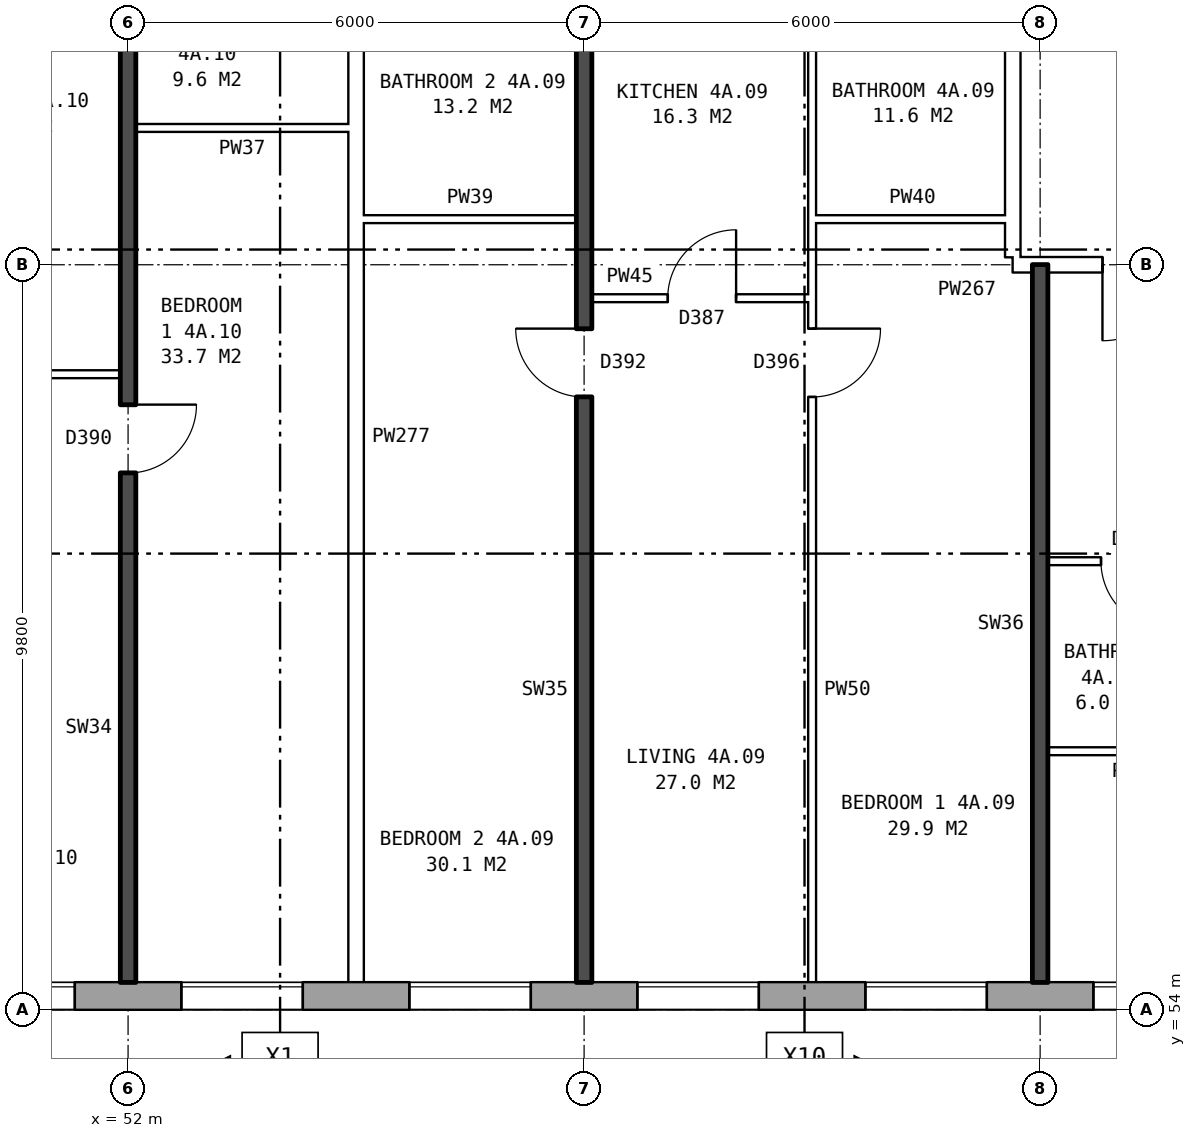
"""IFC4 building model, lengths in metres.
Left out: names, types, materials, properties, quantities, classifications, styles, units other than length and angle.
Written with IfcOpenShell. Run it as: python <this file> out.ifc"""

import sys

from ifc_helpers import new_model, si_unit, direction, frame, frame_2d, origin, place, context, subcontext, project, spatial, rectangle, extrude, element, fill, save


model = new_model("IFC4")
c1 = context("Model", 3, precision=1e-05, world=origin(), true_north=direction((0.0, 1.0)))
c2 = subcontext(c1, "Body", "Model", "MODEL_VIEW")
j1 = project(units=[si_unit("LENGTHUNIT", "METRE"), si_unit("PLANEANGLEUNIT", "RADIAN")], contexts=[c1])
p1 = place(None, origin())
s1 = spatial("IfcSite", under=j1, at=p1, CompositionType="ELEMENT")
p2 = place(p1, origin())
s2 = spatial("IfcBuilding", under=s1, at=p2, CompositionType="ELEMENT")
p3 = place(p2, frame((0.0, 0.0, 19.5)))
s3 = spatial("IfcBuildingStorey", under=s2, at=p3, CompositionType="ELEMENT", Elevation=19.5)
p4 = place(p3, frame((22.825, 54.18, 0.0), z_axis=(0.0, 0.0, 1.0), x_axis=(1.0, 0.0, 0.0)))
e1 = element("IfcWall", 1, at=p4, inside=s3, PredefinedType="STANDARD", context=c2, shape_type="SweptSolid", body=[
    extrude(rectangle(XDim=50.101, YDim=0.36, at=frame_2d((25.05, 0.0))), origin(), (0.0, 0.0, 1.0), 2.85),
])
p5 = place(p4, frame((2.875, 0.0, 0.8)))
e2 = element("IfcOpeningElement", 2, at=p5, cuts=e1, PredefinedType="OPENING", context=c2, shape_type="SweptSolid", body=[
    extrude(rectangle(XDim=1.6, YDim=1.8, at=frame_2d((0.8, 0.9))), frame((0.0, 0.19, 0.0), z_axis=(0.0, -1.0, 0.0), x_axis=(1.0, 0.0, 0.0)), (0.0, 0.0, 1.0), 0.38),
])
p6 = place(p4, frame((5.875, 0.0, 0.8)))
e3 = element("IfcOpeningElement", 3, at=p6, cuts=e1, PredefinedType="OPENING", context=c2, shape_type="SweptSolid", body=[
    extrude(rectangle(XDim=1.6, YDim=1.8, at=frame_2d((0.8, 0.9))), frame((0.0, 0.19, 0.0), z_axis=(0.0, -1.0, 0.0), x_axis=(1.0, 0.0, 0.0)), (0.0, 0.0, 1.0), 0.38),
])
p7 = place(p4, frame((8.875, 0.0, 0.8)))
e4 = element("IfcOpeningElement", 4, at=p7, cuts=e1, PredefinedType="OPENING", context=c2, shape_type="SweptSolid", body=[
    extrude(rectangle(XDim=1.6, YDim=1.8, at=frame_2d((0.8, 0.9))), frame((0.0, 0.19, 0.0), z_axis=(0.0, -1.0, 0.0), x_axis=(1.0, 0.0, 0.0)), (0.0, 0.0, 1.0), 0.38),
])
p8 = place(p4, frame((11.875, 0.0, 0.8)))
e5 = element("IfcOpeningElement", 5, at=p8, cuts=e1, PredefinedType="OPENING", context=c2, shape_type="SweptSolid", body=[
    extrude(rectangle(XDim=1.6, YDim=1.8, at=frame_2d((0.8, 0.9))), frame((0.0, 0.19, 0.0), z_axis=(0.0, -1.0, 0.0), x_axis=(1.0, 0.0, 0.0)), (0.0, 0.0, 1.0), 0.38),
])
p9 = place(p4, frame((14.875, 0.0, 0.8)))
e6 = element("IfcOpeningElement", 6, at=p9, cuts=e1, PredefinedType="OPENING", context=c2, shape_type="SweptSolid", body=[
    extrude(rectangle(XDim=1.6, YDim=1.8, at=frame_2d((0.8, 0.9))), frame((0.0, 0.19, 0.0), z_axis=(0.0, -1.0, 0.0), x_axis=(1.0, 0.0, 0.0)), (0.0, 0.0, 1.0), 0.38),
])
p10 = place(p4, frame((17.875, 0.0, 0.8)))
e7 = element("IfcOpeningElement", 7, at=p10, cuts=e1, PredefinedType="OPENING", context=c2, shape_type="SweptSolid", body=[
    extrude(rectangle(XDim=1.6, YDim=1.8, at=frame_2d((0.8, 0.9))), frame((0.0, 0.19, 0.0), z_axis=(0.0, -1.0, 0.0), x_axis=(1.0, 0.0, 0.0)), (0.0, 0.0, 1.0), 0.38),
])
p11 = place(p4, frame((20.875, 0.0, 0.8)))
e8 = element("IfcOpeningElement", 8, at=p11, cuts=e1, PredefinedType="OPENING", context=c2, shape_type="SweptSolid", body=[
    extrude(rectangle(XDim=1.6, YDim=1.8, at=frame_2d((0.8, 0.9))), frame((0.0, 0.19, 0.0), z_axis=(0.0, -1.0, 0.0), x_axis=(1.0, 0.0, 0.0)), (0.0, 0.0, 1.0), 0.38),
])
p12 = place(p4, frame((23.875, 0.0, 0.8)))
e9 = element("IfcOpeningElement", 9, at=p12, cuts=e1, PredefinedType="OPENING", context=c2, shape_type="SweptSolid", body=[
    extrude(rectangle(XDim=1.6, YDim=1.8, at=frame_2d((0.8, 0.9))), frame((0.0, 0.19, 0.0), z_axis=(0.0, -1.0, 0.0), x_axis=(1.0, 0.0, 0.0)), (0.0, 0.0, 1.0), 0.38),
])
p13 = place(p4, frame((26.875, 0.0, 0.8)))
e10 = element("IfcOpeningElement", 10, at=p13, cuts=e1, PredefinedType="OPENING", context=c2, shape_type="SweptSolid", body=[
    extrude(rectangle(XDim=1.6, YDim=1.8, at=frame_2d((0.8, 0.9))), frame((0.0, 0.19, 0.0), z_axis=(0.0, -1.0, 0.0), x_axis=(1.0, 0.0, 0.0)), (0.0, 0.0, 1.0), 0.38),
])
p14 = place(p4, frame((29.875, 0.0, 0.8)))
e11 = element("IfcOpeningElement", 11, at=p14, cuts=e1, PredefinedType="OPENING", context=c2, shape_type="SweptSolid", body=[
    extrude(rectangle(XDim=1.6, YDim=1.8, at=frame_2d((0.8, 0.9))), frame((0.0, 0.19, 0.0), z_axis=(0.0, -1.0, 0.0), x_axis=(1.0, 0.0, 0.0)), (0.0, 0.0, 1.0), 0.38),
])
p15 = place(p4, frame((32.875, 0.0, 0.8)))
e12 = element("IfcOpeningElement", 12, at=p15, cuts=e1, PredefinedType="OPENING", context=c2, shape_type="SweptSolid", body=[
    extrude(rectangle(XDim=1.6, YDim=1.8, at=frame_2d((0.8, 0.9))), frame((0.0, 0.19, 0.0), z_axis=(0.0, -1.0, 0.0), x_axis=(1.0, 0.0, 0.0)), (0.0, 0.0, 1.0), 0.38),
])
p16 = place(p4, frame((35.875, 0.0, 0.8)))
e13 = element("IfcOpeningElement", 13, at=p16, cuts=e1, PredefinedType="OPENING", context=c2, shape_type="SweptSolid", body=[
    extrude(rectangle(XDim=1.6, YDim=1.8, at=frame_2d((0.8, 0.9))), frame((0.0, 0.19, 0.0), z_axis=(0.0, -1.0, 0.0), x_axis=(1.0, 0.0, 0.0)), (0.0, 0.0, 1.0), 0.38),
])
p17 = place(p4, frame((38.875, 0.0, 0.8)))
e14 = element("IfcOpeningElement", 14, at=p17, cuts=e1, PredefinedType="OPENING", context=c2, shape_type="SweptSolid", body=[
    extrude(rectangle(XDim=1.6, YDim=1.8, at=frame_2d((0.8, 0.9))), frame((0.0, 0.19, 0.0), z_axis=(0.0, -1.0, 0.0), x_axis=(1.0, 0.0, 0.0)), (0.0, 0.0, 1.0), 0.38),
])
p18 = place(p4, frame((41.875, 0.0, 0.8)))
e15 = element("IfcOpeningElement", 15, at=p18, cuts=e1, PredefinedType="OPENING", context=c2, shape_type="SweptSolid", body=[
    extrude(rectangle(XDim=1.6, YDim=1.8, at=frame_2d((0.8, 0.9))), frame((0.0, 0.19, 0.0), z_axis=(0.0, -1.0, 0.0), x_axis=(1.0, 0.0, 0.0)), (0.0, 0.0, 1.0), 0.38),
])
p19 = place(p4, frame((44.875, 0.0, 0.8)))
e16 = element("IfcOpeningElement", 16, at=p19, cuts=e1, PredefinedType="OPENING", context=c2, shape_type="SweptSolid", body=[
    extrude(rectangle(XDim=1.6, YDim=1.8, at=frame_2d((0.8, 0.9))), frame((0.0, 0.19, 0.0), z_axis=(0.0, -1.0, 0.0), x_axis=(1.0, 0.0, 0.0)), (0.0, 0.0, 1.0), 0.38),
])
p20 = place(p4, frame((47.375, 0.0, 0.8)))
e17 = element("IfcOpeningElement", 17, at=p20, cuts=e1, PredefinedType="OPENING", context=c2, shape_type="SweptSolid", body=[
    extrude(rectangle(XDim=1.0, YDim=1.5, at=frame_2d((0.5, 0.75))), frame((0.0, 0.19, 0.0), z_axis=(0.0, -1.0, 0.0), x_axis=(1.0, 0.0, 0.0)), (0.0, 0.0, 1.0), 0.38),
])
p21 = place(p4, frame((48.675, 0.0, 0.8)))
e18 = element("IfcOpeningElement", 18, at=p21, cuts=e1, PredefinedType="OPENING", context=c2, shape_type="SweptSolid", body=[
    extrude(rectangle(XDim=0.6, YDim=0.9, at=frame_2d((0.3, 0.45))), frame((0.0, 0.19, 0.0), z_axis=(0.0, -1.0, 0.0), x_axis=(1.0, 0.0, 0.0)), (0.0, 0.0, 1.0), 0.38),
])
p22 = place(p3, frame((63.64, 63.9, 0.0), z_axis=(0.0, 0.0, 1.0), x_axis=(0.0, 1.0, 0.0)))
e19 = element("IfcWall", 19, at=p22, inside=s3, PredefinedType="PARTITIONING", context=c2, shape_type="SweptSolid", body=[
    extrude(rectangle(XDim=12.2, YDim=0.2, at=frame_2d((6.1, 0.0))), origin(), (0.0, 0.0, 1.0), 2.85),
])
p23 = place(p22, frame((5.1, 0.0, 0.0)))
e20 = element("IfcOpeningElement", 20, at=p23, cuts=e19, PredefinedType="OPENING", context=c2, shape_type="SweptSolid", body=[
    extrude(rectangle(XDim=2.0, YDim=2.1, at=frame_2d((1.0, 1.05))), frame((0.0, 0.11, 0.0), z_axis=(0.0, -1.0, 0.0), x_axis=(1.0, 0.0, 0.0)), (0.0, 0.0, 1.0), 0.22),
])
p24 = place(p3, frame((64.1, 57.4, 0.0), z_axis=(0.0, 0.0, 1.0), x_axis=(1.0, 0.0, 0.0)))
e21 = element("IfcWall", 21, at=p24, inside=s3, PredefinedType="PARTITIONING", context=c2, shape_type="SweptSolid", body=[
    extrude(rectangle(XDim=2.3, YDim=0.1, at=frame_2d((1.15, 0.0))), origin(), (0.0, 0.0, 1.0), 2.85),
])
p25 = place(p3, frame((64.1, 59.9, 0.0), z_axis=(0.0, 0.0, 1.0), x_axis=(1.0, 0.0, 0.0)))
e22 = element("IfcWall", 22, at=p25, inside=s3, PredefinedType="PARTITIONING", context=c2, shape_type="SweptSolid", body=[
    extrude(rectangle(XDim=5.8, YDim=0.1, at=frame_2d((2.9, 0.0))), origin(), (0.0, 0.0, 1.0), 2.85),
])
p26 = place(p25, frame((3.6, 0.0, 0.0)))
e23 = element("IfcOpeningElement", 23, at=p26, cuts=e22, PredefinedType="OPENING", context=c2, shape_type="SweptSolid", body=[
    extrude(rectangle(XDim=0.9, YDim=2.1, at=frame_2d((0.45, 1.05))), frame((0.0, 0.06, 0.0), z_axis=(0.0, -1.0, 0.0), x_axis=(1.0, 0.0, 0.0)), (0.0, 0.0, 1.0), 0.12),
])
p27 = place(p25, frame((0.7, 0.0, 0.0)))
e24 = element("IfcOpeningElement", 24, at=p27, cuts=e22, PredefinedType="OPENING", context=c2, shape_type="SweptSolid", body=[
    extrude(rectangle(XDim=0.9, YDim=2.1, at=frame_2d((0.45, 1.05))), frame((0.0, 0.06, 0.0), z_axis=(0.0, -1.0, 0.0), x_axis=(1.0, 0.0, 0.0)), (0.0, 0.0, 1.0), 0.12),
])
p28 = place(p3, frame((49.0, 62.36, 0.0), z_axis=(0.0, 0.0, 1.0), x_axis=(1.0, 0.0, 0.0)))
e25 = element("IfcWall", 25, at=p28, inside=s3, PredefinedType="PARTITIONING", context=c2, shape_type="SweptSolid", body=[
    extrude(rectangle(XDim=2.9, YDim=0.1, at=frame_2d((1.45, 0.0))), origin(), (0.0, 0.0, 1.0), 2.85),
])
p29 = place(p28, frame((1.0, 0.0, 0.0)))
e26 = element("IfcOpeningElement", 26, at=p29, cuts=e25, PredefinedType="OPENING", context=c2, shape_type="SweptSolid", body=[
    extrude(rectangle(XDim=0.9, YDim=2.1, at=frame_2d((0.45, 1.05))), frame((0.0, 0.06, 0.0), z_axis=(0.0, -1.0, 0.0), x_axis=(1.0, 0.0, 0.0)), (0.0, 0.0, 1.0), 0.12),
])
p30 = place(p3, frame((58.1, 63.36, 0.0), z_axis=(0.0, 0.0, 1.0), x_axis=(1.0, 0.0, 0.0)))
e27 = element("IfcWall", 27, at=p30, inside=s3, PredefinedType="PARTITIONING", context=c2, shape_type="SweptSolid", body=[
    extrude(rectangle(XDim=2.9, YDim=0.1, at=frame_2d((1.45, 0.0))), origin(), (0.0, 0.0, 1.0), 2.85),
])
p31 = place(p30, frame((1.0, 0.0, 0.0)))
e28 = element("IfcOpeningElement", 28, at=p31, cuts=e27, PredefinedType="OPENING", context=c2, shape_type="SweptSolid", body=[
    extrude(rectangle(XDim=0.9, YDim=2.1, at=frame_2d((0.45, 1.05))), frame((0.0, 0.06, 0.0), z_axis=(0.0, -1.0, 0.0), x_axis=(1.0, 0.0, 0.0)), (0.0, 0.0, 1.0), 0.12),
])
p32 = place(p3, frame((63.64, 63.8, 0.0), z_axis=(0.0, 0.0, 1.0), x_axis=(1.0, 0.0, 0.0)))
e29 = element("IfcWall", 29, at=p32, inside=s3, PredefinedType="PARTITIONING", context=c2, shape_type="SweptSolid", body=[
    extrude(rectangle(XDim=3.0, YDim=0.2, at=frame_2d((1.5, 0.0))), origin(), (0.0, 0.0, 1.0), 2.85),
])
p33 = place(p32, frame((1.18, 0.0, 0.0)))
e30 = element("IfcOpeningElement", 30, at=p33, cuts=e29, PredefinedType="OPENING", context=c2, shape_type="SweptSolid", body=[
    extrude(rectangle(XDim=1.0, YDim=2.1, at=frame_2d((0.5, 1.05))), frame((0.0, 0.11, 0.0), z_axis=(0.0, -1.0, 0.0), x_axis=(1.0, 0.0, 0.0)), (0.0, 0.0, 1.0), 0.22),
])
p34 = place(p3, frame((55.1, 64.4, 0.0), z_axis=(0.0, 0.0, 1.0), x_axis=(1.0, 0.0, 0.0)))
e31 = element("IfcWall", 31, at=p34, inside=s3, PredefinedType="PARTITIONING", context=c2, shape_type="SweptSolid", body=[
    extrude(rectangle(XDim=2.8, YDim=0.1, at=frame_2d((1.4, 0.0))), origin(), (0.0, 0.0, 1.0), 2.85),
])
p35 = place(p3, frame((61.0, 64.4, 0.0), z_axis=(0.0, 0.0, 1.0), x_axis=(1.0, 0.0, 0.0)))
e32 = element("IfcWall", 32, at=p35, inside=s3, PredefinedType="PARTITIONING", context=c2, shape_type="SweptSolid", body=[
    extrude(rectangle(XDim=2.64, YDim=0.1, at=frame_2d((1.32, 0.0))), origin(), (0.0, 0.0, 1.0), 2.85),
])
p36 = place(p3, frame((52.1, 65.6, 0.0), z_axis=(0.0, 0.0, 1.0), x_axis=(1.0, 0.0, 0.0)))
e33 = element("IfcWall", 33, at=p36, inside=s3, PredefinedType="PARTITIONING", context=c2, shape_type="SweptSolid", body=[
    extrude(rectangle(XDim=2.8, YDim=0.1, at=frame_2d((1.4, 0.0))), origin(), (0.0, 0.0, 1.0), 2.85),
])
p37 = place(p3, frame((52.0, 54.36, 0.0), z_axis=(0.0, 0.0, 1.0), x_axis=(0.0, 1.0, 0.0)))
e34 = element("IfcWall", 34, at=p37, inside=s3, PredefinedType="SOLIDWALL", context=c2, shape_type="SweptSolid", body=[
    extrude(rectangle(XDim=14.44, YDim=0.2, at=frame_2d((7.22, 0.0))), origin(), (0.0, 0.0, 1.0), 2.85),
])
p38 = place(p37, frame((6.7, 0.0, 0.0)))
e35 = element("IfcOpeningElement", 35, at=p38, cuts=e34, PredefinedType="OPENING", context=c2, shape_type="SweptSolid", body=[
    extrude(rectangle(XDim=0.9, YDim=2.1, at=frame_2d((0.45, 1.05))), frame((0.0, 0.11, 0.0), z_axis=(0.0, -1.0, 0.0), x_axis=(1.0, 0.0, 0.0)), (0.0, 0.0, 1.0), 0.22),
])
p39 = place(p37, frame((13.14, 0.0, 0.0)))
e36 = element("IfcOpeningElement", 36, at=p39, cuts=e34, PredefinedType="OPENING", context=c2, shape_type="SweptSolid", body=[
    extrude(rectangle(XDim=0.9, YDim=2.1, at=frame_2d((0.45, 1.05))), frame((0.0, 0.11, 0.0), z_axis=(0.0, -1.0, 0.0), x_axis=(1.0, 0.0, 0.0)), (0.0, 0.0, 1.0), 0.22),
])
p40 = place(p3, frame((55.0, 54.36, 0.0), z_axis=(0.0, 0.0, 1.0), x_axis=(0.0, 1.0, 0.0)))
e37 = element("IfcWall", 37, at=p40, inside=s3, PredefinedType="PARTITIONING", context=c2, shape_type="SweptSolid", body=[
    extrude(rectangle(XDim=14.34, YDim=0.2, at=frame_2d((7.17, 0.0))), origin(), (0.0, 0.0, 1.0), 2.85),
])
p41 = place(p3, frame((58.0, 54.36, 0.0), z_axis=(0.0, 0.0, 1.0), x_axis=(0.0, 1.0, 0.0)))
e38 = element("IfcWall", 38, at=p41, inside=s3, PredefinedType="SOLIDWALL", context=c2, shape_type="SweptSolid", body=[
    extrude(rectangle(XDim=14.44, YDim=0.2, at=frame_2d((7.22, 0.0))), origin(), (0.0, 0.0, 1.0), 2.85),
])
p42 = place(p41, frame((7.7, 0.0, 0.0)))
e39 = element("IfcOpeningElement", 39, at=p42, cuts=e38, PredefinedType="OPENING", context=c2, shape_type="SweptSolid", body=[
    extrude(rectangle(XDim=0.9, YDim=2.1, at=frame_2d((0.45, 1.05))), frame((0.0, 0.11, 0.0), z_axis=(0.0, -1.0, 0.0), x_axis=(1.0, 0.0, 0.0)), (0.0, 0.0, 1.0), 0.22),
])
p43 = place(p41, frame((13.14, 0.0, 0.0)))
e40 = element("IfcOpeningElement", 40, at=p43, cuts=e38, PredefinedType="OPENING", context=c2, shape_type="SweptSolid", body=[
    extrude(rectangle(XDim=0.9, YDim=2.1, at=frame_2d((0.45, 1.05))), frame((0.0, 0.11, 0.0), z_axis=(0.0, -1.0, 0.0), x_axis=(1.0, 0.0, 0.0)), (0.0, 0.0, 1.0), 0.22),
])
p44 = place(p3, frame((61.0, 54.36, 0.0), z_axis=(0.0, 0.0, 1.0), x_axis=(0.0, 1.0, 0.0)))
e41 = element("IfcWall", 41, at=p44, inside=s3, PredefinedType="PARTITIONING", context=c2, shape_type="SweptSolid", body=[
    extrude(rectangle(XDim=14.34, YDim=0.1, at=frame_2d((7.17, 0.0))), origin(), (0.0, 0.0, 1.0), 2.85),
])
p45 = place(p44, frame((7.7, 0.0, 0.0)))
e42 = element("IfcOpeningElement", 42, at=p45, cuts=e41, PredefinedType="OPENING", context=c2, shape_type="SweptSolid", body=[
    extrude(rectangle(XDim=0.9, YDim=2.1, at=frame_2d((0.45, 1.05))), frame((0.0, 0.06, 0.0), z_axis=(0.0, -1.0, 0.0), x_axis=(1.0, 0.0, 0.0)), (0.0, 0.0, 1.0), 0.12),
])
p46 = place(p44, frame((13.04, 0.0, 0.0)))
e43 = element("IfcOpeningElement", 43, at=p46, cuts=e41, PredefinedType="OPENING", context=c2, shape_type="SweptSolid", body=[
    extrude(rectangle(XDim=0.9, YDim=2.1, at=frame_2d((0.45, 1.05))), frame((0.0, 0.06, 0.0), z_axis=(0.0, -1.0, 0.0), x_axis=(1.0, 0.0, 0.0)), (0.0, 0.0, 1.0), 0.12),
])
p47 = place(p3, frame((64.0, 54.36, 0.0), z_axis=(0.0, 0.0, 1.0), x_axis=(0.0, 1.0, 0.0)))
e44 = element("IfcWall", 44, at=p47, inside=s3, PredefinedType="SOLIDWALL", context=c2, shape_type="SweptSolid", body=[
    extrude(rectangle(XDim=9.44, YDim=0.2, at=frame_2d((4.72, 0.0))), origin(), (0.0, 0.0, 1.0), 2.85),
])
p48 = place(p13, origin())
e45 = element("IfcWindow", 45, at=p48, inside=s3, PartitioningType="SINGLE_PANEL", PredefinedType="WINDOW", context=c2, shape_type="SweptSolid", body=[
    extrude(rectangle(XDim=1.6, YDim=1.8, at=frame_2d((0.8, 0.9))), frame((0.0, 0.15, 0.0), z_axis=(0.0, -1.0, 0.0), x_axis=(1.0, 0.0, 0.0)), (0.0, 0.0, 1.0), 0.06),
])
fill(e10, e45)
p49 = place(p14, origin())
e46 = element("IfcWindow", 46, at=p49, inside=s3, PartitioningType="SINGLE_PANEL", PredefinedType="WINDOW", context=c2, shape_type="SweptSolid", body=[
    extrude(rectangle(XDim=1.6, YDim=1.8, at=frame_2d((0.8, 0.9))), frame((0.0, 0.15, 0.0), z_axis=(0.0, -1.0, 0.0), x_axis=(1.0, 0.0, 0.0)), (0.0, 0.0, 1.0), 0.06),
])
fill(e11, e46)
p50 = place(p15, origin())
e47 = element("IfcWindow", 47, at=p50, inside=s3, PartitioningType="SINGLE_PANEL", PredefinedType="WINDOW", context=c2, shape_type="SweptSolid", body=[
    extrude(rectangle(XDim=1.6, YDim=1.8, at=frame_2d((0.8, 0.9))), frame((0.0, 0.15, 0.0), z_axis=(0.0, -1.0, 0.0), x_axis=(1.0, 0.0, 0.0)), (0.0, 0.0, 1.0), 0.06),
])
fill(e12, e47)
p51 = place(p16, origin())
e48 = element("IfcWindow", 48, at=p51, inside=s3, PartitioningType="SINGLE_PANEL", PredefinedType="WINDOW", context=c2, shape_type="SweptSolid", body=[
    extrude(rectangle(XDim=1.6, YDim=1.8, at=frame_2d((0.8, 0.9))), frame((0.0, 0.15, 0.0), z_axis=(0.0, -1.0, 0.0), x_axis=(1.0, 0.0, 0.0)), (0.0, 0.0, 1.0), 0.06),
])
fill(e13, e48)
p52 = place(p17, origin())
e49 = element("IfcWindow", 49, at=p52, inside=s3, PartitioningType="SINGLE_PANEL", PredefinedType="WINDOW", context=c2, shape_type="SweptSolid", body=[
    extrude(rectangle(XDim=1.6, YDim=1.8, at=frame_2d((0.8, 0.9))), frame((0.0, 0.15, 0.0), z_axis=(0.0, -1.0, 0.0), x_axis=(1.0, 0.0, 0.0)), (0.0, 0.0, 1.0), 0.06),
])
fill(e14, e49)
p53 = place(p18, origin())
e50 = element("IfcWindow", 50, at=p53, inside=s3, PartitioningType="SINGLE_PANEL", PredefinedType="WINDOW", context=c2, shape_type="SweptSolid", body=[
    extrude(rectangle(XDim=1.6, YDim=1.8, at=frame_2d((0.8, 0.9))), frame((0.0, 0.15, 0.0), z_axis=(0.0, -1.0, 0.0), x_axis=(1.0, 0.0, 0.0)), (0.0, 0.0, 1.0), 0.06),
])
fill(e15, e50)
p54 = place(p33, frame((1.0, 0.0, 0.0), z_axis=(0.0, 0.0, 1.0), x_axis=(-1.0, 0.0, 0.0)))
e51 = element("IfcDoor", 51, at=p54, inside=s3, OperationType="SINGLE_SWING_RIGHT", PredefinedType="DOOR", context=c2, shape_type="SweptSolid", body=[
    extrude(rectangle(XDim=1.0, YDim=2.1, at=frame_2d((0.5, 1.05))), frame((0.0, 0.025, 0.0), z_axis=(0.0, -1.0, 0.0), x_axis=(1.0, 0.0, 0.0)), (0.0, 0.0, 1.0), 0.05),
])
fill(e30, e51)
p55 = place(p27, frame((0.9, 0.0, 0.0), z_axis=(0.0, 0.0, 1.0), x_axis=(-1.0, 0.0, 0.0)))
e52 = element("IfcDoor", 52, at=p55, inside=s3, OperationType="SINGLE_SWING_LEFT", PredefinedType="DOOR", context=c2, shape_type="SweptSolid", body=[
    extrude(rectangle(XDim=0.9, YDim=2.1, at=frame_2d((0.45, 1.05))), frame((0.0, 0.025, 0.0), z_axis=(0.0, -1.0, 0.0), x_axis=(1.0, 0.0, 0.0)), (0.0, 0.0, 1.0), 0.05),
])
fill(e24, e52)
p56 = place(p45, frame((0.9, 0.0, 0.0), z_axis=(0.0, 0.0, 1.0), x_axis=(-1.0, 0.0, 0.0)))
e53 = element("IfcDoor", 53, at=p56, inside=s3, OperationType="SINGLE_SWING_LEFT", PredefinedType="DOOR", context=c2, shape_type="SweptSolid", body=[
    extrude(rectangle(XDim=0.9, YDim=2.1, at=frame_2d((0.45, 1.05))), frame((0.0, 0.025, 0.0), z_axis=(0.0, -1.0, 0.0), x_axis=(1.0, 0.0, 0.0)), (0.0, 0.0, 1.0), 0.05),
])
fill(e42, e53)
p57 = place(p42, origin())
e54 = element("IfcDoor", 54, at=p57, inside=s3, OperationType="SINGLE_SWING_RIGHT", PredefinedType="DOOR", context=c2, shape_type="SweptSolid", body=[
    extrude(rectangle(XDim=0.9, YDim=2.1, at=frame_2d((0.45, 1.05))), frame((0.0, 0.025, 0.0), z_axis=(0.0, -1.0, 0.0), x_axis=(1.0, 0.0, 0.0)), (0.0, 0.0, 1.0), 0.05),
])
fill(e39, e54)
p58 = place(p31, origin())
e55 = element("IfcDoor", 55, at=p58, inside=s3, OperationType="SINGLE_SWING_RIGHT", PredefinedType="DOOR", context=c2, shape_type="SweptSolid", body=[
    extrude(rectangle(XDim=0.9, YDim=2.1, at=frame_2d((0.45, 1.05))), frame((0.0, 0.025, 0.0), z_axis=(0.0, -1.0, 0.0), x_axis=(1.0, 0.0, 0.0)), (0.0, 0.0, 1.0), 0.05),
])
fill(e28, e55)
p59 = place(p38, frame((0.9, 0.0, 0.0), z_axis=(0.0, 0.0, 1.0), x_axis=(-1.0, 0.0, 0.0)))
e56 = element("IfcDoor", 56, at=p59, inside=s3, OperationType="SINGLE_SWING_LEFT", PredefinedType="DOOR", context=c2, shape_type="SweptSolid", body=[
    extrude(rectangle(XDim=0.9, YDim=2.1, at=frame_2d((0.45, 1.05))), frame((0.0, 0.025, 0.0), z_axis=(0.0, -1.0, 0.0), x_axis=(1.0, 0.0, 0.0)), (0.0, 0.0, 1.0), 0.05),
])
fill(e35, e56)
save(model, sys.argv[1])
